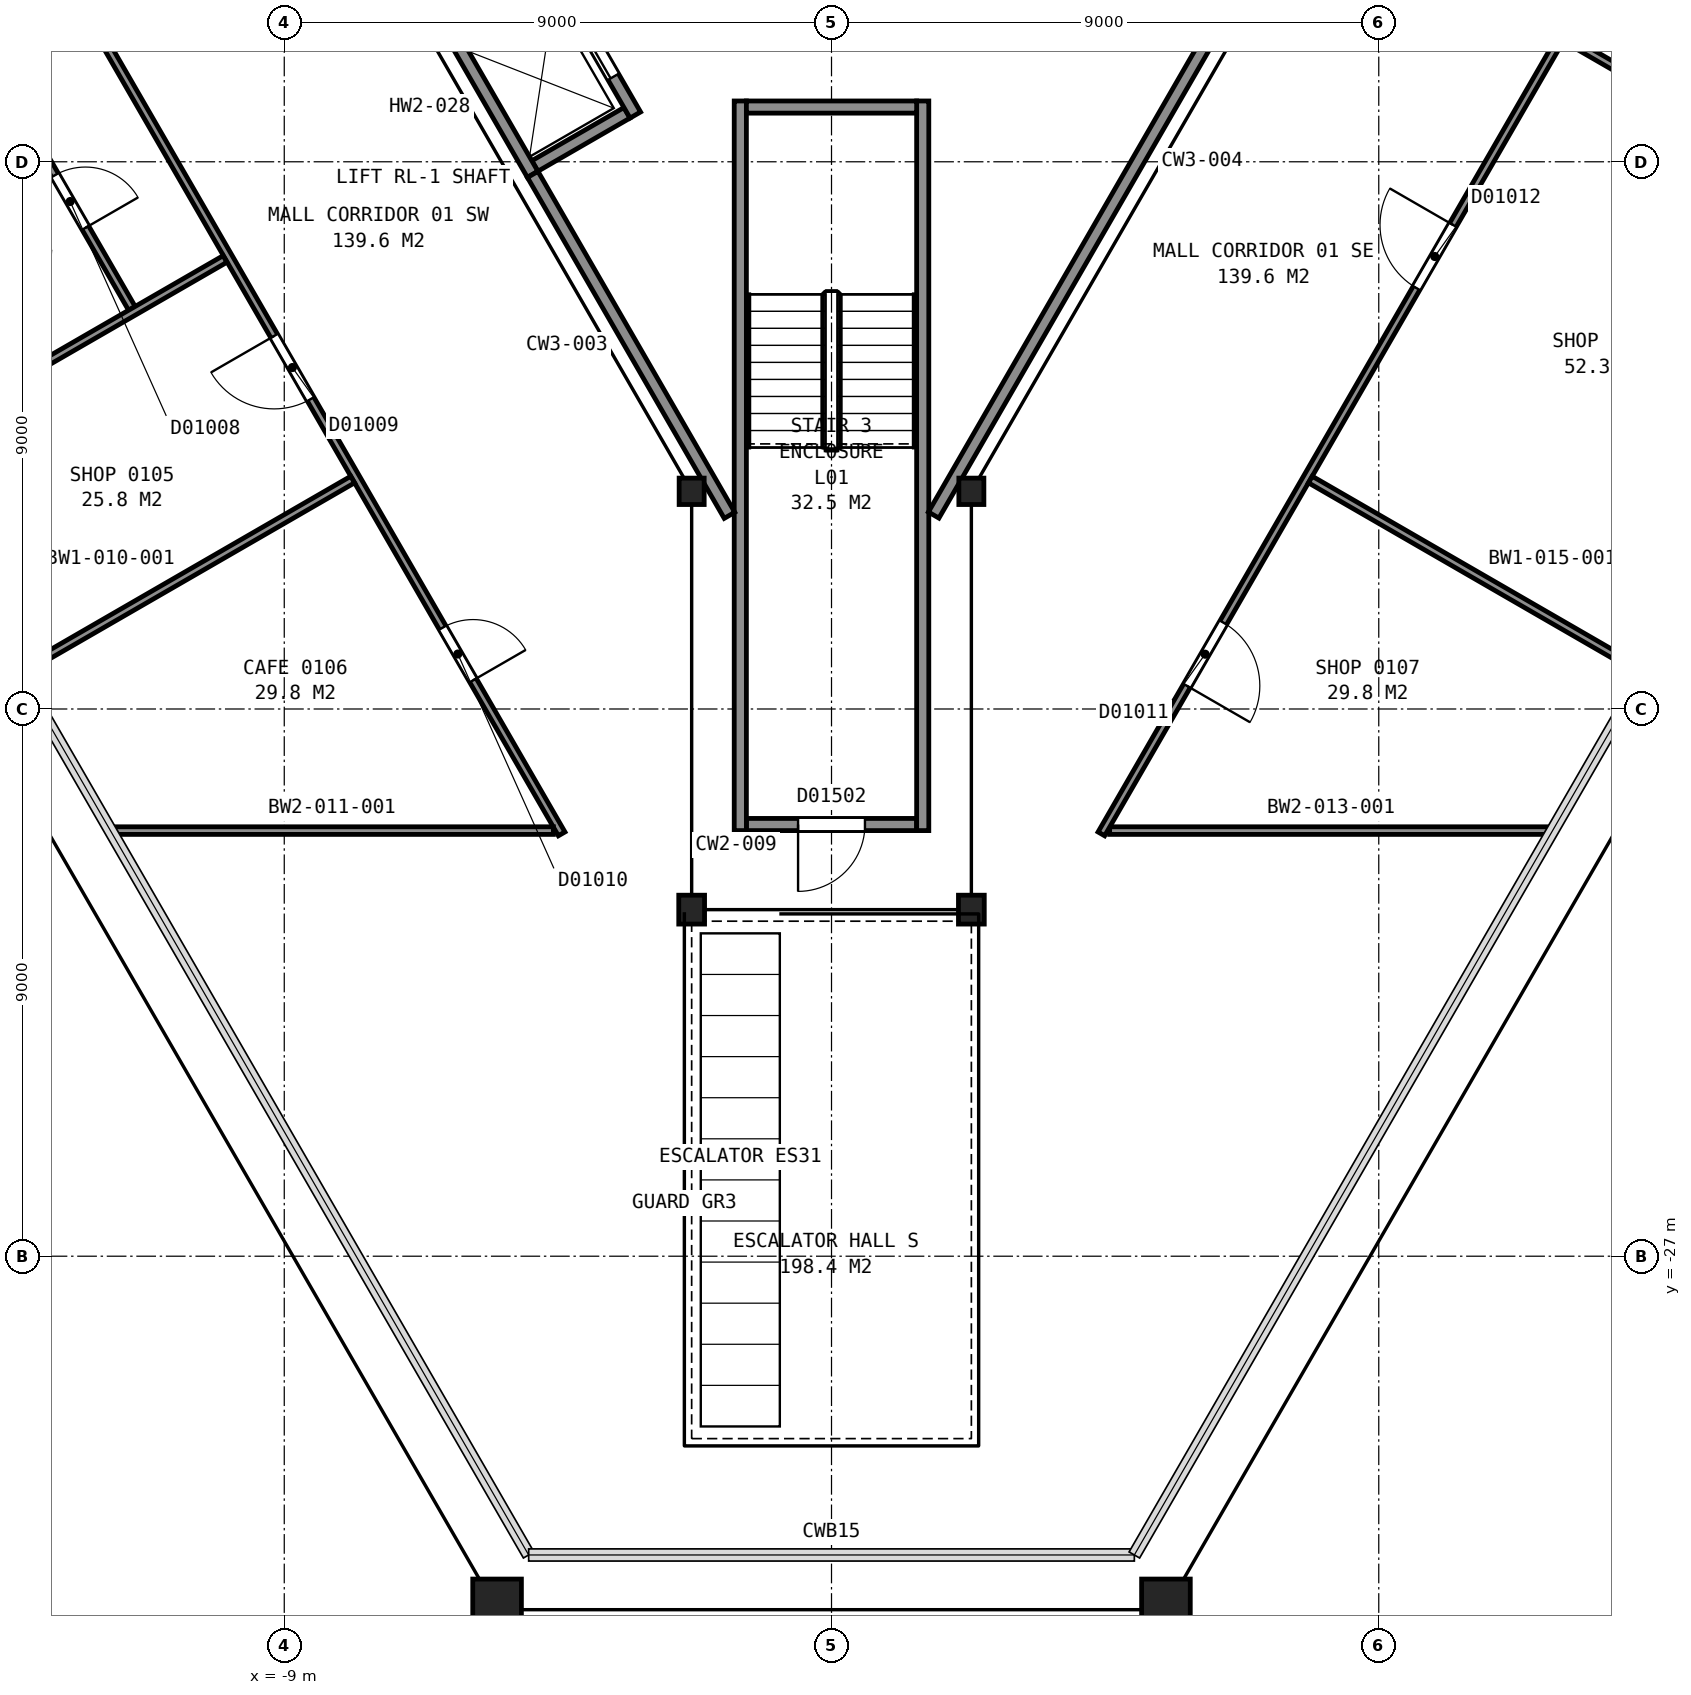
"""IFC4 building model, lengths in metres.
Left out: names, types, materials, properties, quantities, classifications, styles, units other than length and angle.
Written with IfcOpenShell. Run it as: python <this file> out.ifc"""

import sys

from ifc_helpers import new_model, si_unit, direction, frame, frame_2d, origin, origin_2d, place, context, subcontext, project, spatial, rectangle, hollow_rectangle, i_section, extrude, element, fill, save


model = new_model("IFC4")
c1 = context("Model", 3, precision=1e-05, world=origin(), true_north=direction((0.0, 1.0)))
c2 = subcontext(c1, "Body", "Model", "MODEL_VIEW")
j1 = project(units=[si_unit("LENGTHUNIT", "METRE"), si_unit("PLANEANGLEUNIT", "RADIAN")], contexts=[c1])
p1 = place(None, origin())
s1 = spatial("IfcSite", under=j1, at=p1, CompositionType="ELEMENT")
p2 = place(p1, origin())
s2 = spatial("IfcBuilding", under=s1, at=p2, CompositionType="ELEMENT")
p3 = place(p2, frame((0.0, 0.0, 12.0)))
s3 = spatial("IfcBuildingStorey", under=s2, at=p3, CompositionType="ELEMENT", Elevation=12.0)
for number, where, z_axis, x_axis in (
    (1, (-5.5, -32.81, 0.0), (0.0, 0.0, 1.0), (-1.0, 0.0, 0.0)),
    (2, (5.5, -32.81, 0.0), (0.0, 0.0, 1.0), (-1.0, 0.0, 0.0)),
):
    element("IfcColumn", number, at=place(p3, frame(where, z_axis=z_axis, x_axis=x_axis)), inside=s3, PredefinedType="COLUMN", context=c2, shape_type="SweptSolid", body=[
        extrude(hollow_rectangle(XDim=0.8, YDim=1.0, WallThickness=0.075, at=origin_2d()), origin(), (0.0, 0.0, 1.0), 5.4),
    ])
p4 = place(p3, frame((-2.3, -14.42, 0.0), z_axis=(0.0, 0.0, 1.0), x_axis=(1.0, 0.0, 0.0)))
e3 = element("IfcColumn", 3, at=p4, inside=s3, PredefinedType="COLUMN", context=c2, shape_type="SweptSolid", body=[
    extrude(i_section(OverallWidth=0.411, OverallDepth=0.434, WebThickness=0.036, FlangeThickness=0.057, FilletRadius=0.015, at=origin_2d()), origin(), (0.0, 0.0, 1.0), 5.4),
])
for number, where, z_axis, x_axis in (
    (4, (-2.3, -21.3, 0.0), (0.0, 0.0, 1.0), (-1.0, 0.0, 0.0)),
    (5, (2.3, -21.3, 0.0), (0.0, 0.0, 1.0), (-1.0, 0.0, 0.0)),
):
    element("IfcColumn", number, at=place(p3, frame(where, z_axis=z_axis, x_axis=x_axis)), inside=s3, PredefinedType="COLUMN", context=c2, shape_type="SweptSolid", body=[
        extrude(i_section(OverallWidth=0.424, OverallDepth=0.475, WebThickness=0.048, FlangeThickness=0.077, FilletRadius=0.015, at=origin_2d()), origin(), (0.0, 0.0, 1.0), 5.4),
    ])
p5 = place(p3, frame((2.3, -14.42, 0.0), z_axis=(0.0, 0.0, 1.0), x_axis=(1.0, 0.0, 0.0)))
e6 = element("IfcColumn", 6, at=p5, inside=s3, PredefinedType="COLUMN", context=c2, shape_type="SweptSolid", body=[
    extrude(i_section(OverallWidth=0.411, OverallDepth=0.434, WebThickness=0.036, FlangeThickness=0.057, FilletRadius=0.015, at=origin_2d()), origin(), (0.0, 0.0, 1.0), 5.4),
])
p6 = place(p3, frame((-1.4, -19.9, 0.0), z_axis=(0.0, 0.0, 1.0), x_axis=(1.0, 0.0, 0.0)))
e7 = element("IfcWall", 7, at=p6, inside=s3, PredefinedType="PARTITIONING", context=c2, shape_type="SweptSolid", body=[
    extrude(rectangle(XDim=2.8, YDim=0.2, at=frame_2d((1.4, 0.0))), origin(), (0.0, 0.0, 1.0), 5.15),
])
p7 = place(p6, frame((0.85, 0.0, 0.0)))
e8 = element("IfcOpeningElement", 8, at=p7, cuts=e7, PredefinedType="OPENING", context=c2, shape_type="SweptSolid", body=[
    extrude(rectangle(XDim=1.1, YDim=2.1, at=frame_2d((0.55, 1.05))), frame((0.0, 0.11, 0.0), z_axis=(0.0, -1.0, 0.0), x_axis=(1.0, 0.0, 0.0)), (0.0, 0.0, 1.0), 0.22),
])
for number, where, z_axis, x_axis in (
    (9, (1.5, -8.0, 0.0), (0.0, 0.0, 1.0), (0.0, -1.0, 0.0)),
    (10, (-1.5, -8.0, 0.0), (0.0, 0.0, 1.0), (0.0, -1.0, 0.0)),
):
    element("IfcWall", number, at=place(p3, frame(where, z_axis=z_axis, x_axis=x_axis)), inside=s3, PredefinedType="PARTITIONING", context=c2, shape_type="SweptSolid", body=[
        extrude(rectangle(XDim=12.0, YDim=0.2, at=frame_2d((6.0, 0.0))), origin(), (0.0, 0.0, 1.0), 5.15),
    ])
p8 = place(p3, frame((-1.4, -8.1, 0.0), z_axis=(0.0, 0.0, 1.0), x_axis=(1.0, 0.0, 0.0)))
e11 = element("IfcWall", 11, at=p8, inside=s3, PredefinedType="PARTITIONING", context=c2, shape_type="SweptSolid", body=[
    extrude(rectangle(XDim=2.8, YDim=0.2, at=frame_2d((1.4, 0.0))), origin(), (0.0, 0.0, 1.0), 5.15),
])
p9 = place(p3, frame((-4.879, -9.07, 0.0), z_axis=(0.0, 0.0, 1.0), x_axis=(0.866036909293, 0.499980071345, 0.0)))
e12 = element("IfcWall", 12, at=p9, inside=s3, PredefinedType="PARTITIONING", context=c2, shape_type="SweptSolid", body=[
    extrude(rectangle(XDim=1.75, YDim=0.2, at=frame_2d((0.875, 0.0))), origin(), (0.0, 0.0, 1.0), 5.4),
])
p10 = place(p3, frame((-3.227, -8.231, 0.0), z_axis=(0.0, 0.0, 1.0), x_axis=(-0.499948979701, 0.866054858364, 0.0)))
e13 = element("IfcWall", 13, at=p10, inside=s3, PredefinedType="PARTITIONING", context=c2, shape_type="SweptSolid", body=[
    extrude(rectangle(XDim=2.55, YDim=0.2, at=frame_2d((1.275, 0.0))), origin(), (0.0, 0.0, 1.0), 5.4),
])
p11 = place(p10, frame((0.725, 0.0, 0.0)))
e14 = element("IfcOpeningElement", 14, at=p11, cuts=e13, PredefinedType="OPENING", context=c2, shape_type="SweptSolid", body=[
    extrude(rectangle(XDim=1.1, YDim=2.1, at=frame_2d((0.55, 1.05))), frame((0.0, 0.11, 0.0), z_axis=(0.0, -1.0, 0.0), x_axis=(1.0, 0.0, 0.0)), (0.0, 0.0, 1.0), 0.22),
])
p12 = place(p3, frame((-4.916, -9.206, 0.0), z_axis=(0.0, 0.0, 1.0), x_axis=(-0.499990435942, 0.866030925526, 0.0)))
e15 = element("IfcWall", 15, at=p12, inside=s3, PredefinedType="PARTITIONING", context=c2, shape_type="SweptSolid", body=[
    extrude(rectangle(XDim=2.55, YDim=0.2, at=frame_2d((1.275, 0.0))), origin(), (0.0, 0.0, 1.0), 5.4),
])
p13 = place(p3, frame((-4.914, -9.208, 0.0), z_axis=(0.0, 0.0, 1.0), x_axis=(0.499947703927, -0.866055594831, 0.0)))
e16 = element("IfcWall", 16, at=p13, inside=s3, PredefinedType="PARTITIONING", context=c2, shape_type="SweptSolid", body=[
    extrude(rectangle(XDim=6.474, YDim=0.2, at=frame_2d((3.237, 0.0))), origin(), (0.0, 0.0, 1.0), 5.15),
])
p14 = place(p3, frame((1.68, -14.811, 0.0), z_axis=(0.0, 0.0, 1.0), x_axis=(0.499994327219, 0.866028678941, 0.0)))
e17 = element("IfcWall", 17, at=p14, inside=s3, PredefinedType="PARTITIONING", context=c2, shape_type="SweptSolid", body=[
    extrude(rectangle(XDim=23.968, YDim=0.2, at=frame_2d((11.984, 0.0))), origin(), (0.0, 0.0, 1.0), 5.15),
])
p15 = place(p14, frame((13.44, 0.0, 0.0)))
e18 = element("IfcOpeningElement", 18, at=p15, cuts=e17, PredefinedType="OPENING", context=c2, shape_type="SweptSolid", body=[
    extrude(rectangle(XDim=1.8, YDim=2.1, at=frame_2d((0.9, 1.05))), frame((0.0, 0.11, 0.0), z_axis=(0.0, -1.0, 0.0), x_axis=(1.0, 0.0, 0.0)), (0.0, 0.0, 1.0), 0.22),
])
p16 = place(p3, frame((-4.438, -20.054, 0.0), z_axis=(0.0, 0.0, 1.0), x_axis=(-0.499994028088, 0.866028851642, 0.0)))
e19 = element("IfcWall", 19, at=p16, inside=s3, PredefinedType="PARTITIONING", context=c2, shape_type="SweptSolid", body=[
    extrude(rectangle(XDim=30.297, YDim=0.125, at=frame_2d((15.148, 0.0))), origin(), (0.0, 0.0, 1.0), 4.253),
])
p17 = place(p16, frame((26.285, 0.0, 0.0)))
e20 = element("IfcOpeningElement", 20, at=p17, cuts=e19, PredefinedType="OPENING", context=c2, shape_type="SweptSolid", body=[
    extrude(rectangle(XDim=1.2, YDim=2.1, at=frame_2d((0.6, 1.05))), frame((0.0, 0.073, 0.0), z_axis=(0.0, -1.0, 0.0), x_axis=(1.0, 0.0, 0.0)), (0.0, 0.0, 1.0), 0.145),
])
p18 = place(p16, frame((16.731, 0.0, 0.0)))
e21 = element("IfcOpeningElement", 21, at=p18, cuts=e19, PredefinedType="OPENING", context=c2, shape_type="SweptSolid", body=[
    extrude(rectangle(XDim=1.0, YDim=2.1, at=frame_2d((0.5, 1.05))), frame((0.0, 0.073, 0.0), z_axis=(0.0, -1.0, 0.0), x_axis=(1.0, 0.0, 0.0)), (0.0, 0.0, 1.0), 0.145),
])
p19 = place(p16, frame((8.257, 0.0, 0.0)))
e22 = element("IfcOpeningElement", 22, at=p19, cuts=e19, PredefinedType="OPENING", context=c2, shape_type="SweptSolid", body=[
    extrude(rectangle(XDim=1.2, YDim=2.1, at=frame_2d((0.6, 1.05))), frame((0.0, 0.073, 0.0), z_axis=(0.0, -1.0, 0.0), x_axis=(1.0, 0.0, 0.0)), (0.0, 0.0, 1.0), 0.145),
])
p20 = place(p16, frame((2.916, 0.0, 0.0)))
e23 = element("IfcOpeningElement", 23, at=p20, cuts=e19, PredefinedType="OPENING", context=c2, shape_type="SweptSolid", body=[
    extrude(rectangle(XDim=1.0, YDim=2.1, at=frame_2d((0.5, 1.05))), frame((0.0, 0.073, 0.0), z_axis=(0.0, -1.0, 0.0), x_axis=(1.0, 0.0, 0.0)), (0.0, 0.0, 1.0), 0.145),
])
p21 = place(p3, frame((-11.506, -11.411, 0.0), z_axis=(0.0, 0.0, 1.0), x_axis=(-0.499977189168, 0.866038573224, 0.0)))
e24 = element("IfcWall", 24, at=p21, inside=s3, PredefinedType="PARTITIONING", context=c2, shape_type="SweptSolid", body=[
    extrude(rectangle(XDim=12.444, YDim=0.125, at=frame_2d((6.222, 0.0))), origin(), (0.0, 0.0, 1.0), 5.24),
])
p22 = place(p21, frame((9.912, 0.0, 0.0)))
e25 = element("IfcOpeningElement", 25, at=p22, cuts=e24, PredefinedType="OPENING", context=c2, shape_type="SweptSolid", body=[
    extrude(rectangle(XDim=1.0, YDim=2.1, at=frame_2d((0.5, 1.05))), frame((0.0, 0.073, 0.0), z_axis=(0.0, -1.0, 0.0), x_axis=(1.0, 0.0, 0.0)), (0.0, 0.0, 1.0), 0.145),
])
p23 = place(p21, frame((5.72, 0.0, 0.0)))
e26 = element("IfcOpeningElement", 26, at=p23, cuts=e24, PredefinedType="OPENING", context=c2, shape_type="SweptSolid", body=[
    extrude(rectangle(XDim=1.0, YDim=2.1, at=frame_2d((0.5, 1.05))), frame((0.0, 0.073, 0.0), z_axis=(0.0, -1.0, 0.0), x_axis=(1.0, 0.0, 0.0)), (0.0, 0.0, 1.0), 0.145),
])
p24 = place(p21, frame((1.529, 0.0, 0.0)))
e27 = element("IfcOpeningElement", 27, at=p24, cuts=e24, PredefinedType="OPENING", context=c2, shape_type="SweptSolid", body=[
    extrude(rectangle(XDim=1.0, YDim=2.1, at=frame_2d((0.5, 1.05))), frame((0.0, 0.073, 0.0), z_axis=(0.0, -1.0, 0.0), x_axis=(1.0, 0.0, 0.0)), (0.0, 0.0, 1.0), 0.145),
])
p25 = place(p3, frame((-15.459, -13.765, 0.0), z_axis=(0.0, 0.0, 1.0), x_axis=(0.866044997331, 0.499966061446, 0.0)))
e28 = element("IfcWall", 28, at=p25, inside=s3, PredefinedType="PARTITIONING", context=c2, shape_type="SweptSolid", body=[
    extrude(rectangle(XDim=6.333, YDim=0.125, at=frame_2d((3.167, 0.0))), origin(), (0.0, 0.0, 1.0), 5.24),
])
p26 = place(p3, frame((-13.363, -17.395, 0.0), z_axis=(0.0, 0.0, 1.0), x_axis=(0.866003371142, 0.500038159714, 0.0)))
e29 = element("IfcWall", 29, at=p26, inside=s3, PredefinedType="PARTITIONING", context=c2, shape_type="SweptSolid", body=[
    extrude(rectangle(XDim=6.337, YDim=0.125, at=frame_2d((3.168, 0.0))), origin(), (0.0, 0.0, 1.0), 4.253),
])
for number, where, z_axis, x_axis in (
    (30, (-11.859, -20.0, 0.0), (0.0, 0.0, 1.0), (1.0, 0.0, 0.0)),
    (31, (4.574, -20.0, 0.0), (0.0, 0.0, 1.0), (1.0, 0.0, 0.0)),
):
    element("IfcWall", number, at=place(p3, frame(where, z_axis=z_axis, x_axis=x_axis)), inside=s3, PredefinedType="PARTITIONING", context=c2, shape_type="SweptSolid", body=[
        extrude(rectangle(XDim=7.285, YDim=0.125, at=frame_2d((3.643, 0.0))), origin(), (0.0, 0.0, 1.0), 5.24),
    ])
p27 = place(p3, frame((19.586, 6.184, 0.0), z_axis=(0.0, 0.0, 1.0), x_axis=(-0.499994028088, -0.866028851642, 0.0)))
e32 = element("IfcWall", 32, at=p27, inside=s3, PredefinedType="PARTITIONING", context=c2, shape_type="SweptSolid", body=[
    extrude(rectangle(XDim=30.297, YDim=0.125, at=frame_2d((15.148, 0.0))), origin(), (0.0, 0.0, 1.0), 4.253),
])
p28 = place(p27, frame((26.285, 0.0, 0.0)))
e33 = element("IfcOpeningElement", 33, at=p28, cuts=e32, PredefinedType="OPENING", context=c2, shape_type="SweptSolid", body=[
    extrude(rectangle(XDim=1.2, YDim=2.1, at=frame_2d((0.6, 1.05))), frame((0.0, 0.073, 0.0), z_axis=(0.0, -1.0, 0.0), x_axis=(1.0, 0.0, 0.0)), (0.0, 0.0, 1.0), 0.145),
])
p29 = place(p27, frame((18.732, 0.0, 0.0)))
e34 = element("IfcOpeningElement", 34, at=p29, cuts=e32, PredefinedType="OPENING", context=c2, shape_type="SweptSolid", body=[
    extrude(rectangle(XDim=1.2, YDim=2.1, at=frame_2d((0.6, 1.05))), frame((0.0, 0.073, 0.0), z_axis=(0.0, -1.0, 0.0), x_axis=(1.0, 0.0, 0.0)), (0.0, 0.0, 1.0), 0.145),
])
for number, where, z_axis, x_axis in (
    (35, (7.875, -14.226, 0.0), (0.0, 0.0, 1.0), (0.866, -0.5, 0.0)),
    (36, (12.066, -6.966, 0.0), (0.0, 0.0, 1.0), (0.866, -0.5, 0.0)),
):
    element("IfcWall", number, at=place(p3, frame(where, z_axis=z_axis, x_axis=x_axis)), inside=s3, PredefinedType="PARTITIONING", context=c2, shape_type="SweptSolid", body=[
        extrude(rectangle(XDim=6.337, YDim=0.125, at=frame_2d((3.168, 0.0))), origin(), (0.0, 0.0, 1.0), 4.253),
    ])
p30 = place(p7, origin())
e37 = element("IfcDoor", 37, at=p30, inside=s3, OperationType="SINGLE_SWING_LEFT", PredefinedType="DOOR", context=c2, shape_type="SweptSolid", body=[
    extrude(rectangle(XDim=1.1, YDim=2.1, at=frame_2d((0.55, 1.05))), frame((0.0, 0.025, 0.0), z_axis=(0.0, -1.0, 0.0), x_axis=(1.0, 0.0, 0.0)), (0.0, 0.0, 1.0), 0.05),
])
fill(e8, e37)
p31 = place(p11, origin())
e38 = element("IfcDoor", 38, at=p31, inside=s3, OperationType="SLIDING_TO_LEFT", PredefinedType="DOOR", context=c2, shape_type="SweptSolid", body=[
    extrude(rectangle(XDim=1.1, YDim=2.1, at=frame_2d((0.55, 1.05))), frame((0.0, 0.025, 0.0), z_axis=(0.0, -1.0, 0.0), x_axis=(1.0, 0.0, 0.0)), (0.0, 0.0, 1.0), 0.05),
])
fill(e14, e38)
p32 = place(p19, origin())
e39 = element("IfcDoor", 39, at=p32, inside=s3, OperationType="SINGLE_SWING_RIGHT", PredefinedType="DOOR", context=c2, shape_type="SweptSolid", body=[
    extrude(rectangle(XDim=1.2, YDim=2.1, at=frame_2d((0.6, 1.05))), frame((0.0, 0.025, 0.0), z_axis=(0.0, -1.0, 0.0), x_axis=(1.0, 0.0, 0.0)), (0.0, 0.0, 1.0), 0.05),
])
fill(e22, e39)
p33 = place(p20, origin())
e40 = element("IfcDoor", 40, at=p33, inside=s3, OperationType="SINGLE_SWING_LEFT", PredefinedType="DOOR", context=c2, shape_type="SweptSolid", body=[
    extrude(rectangle(XDim=1.0, YDim=2.1, at=frame_2d((0.5, 1.05))), frame((0.0, 0.025, 0.0), z_axis=(0.0, -1.0, 0.0), x_axis=(1.0, 0.0, 0.0)), (0.0, 0.0, 1.0), 0.05),
])
fill(e23, e40)
p34 = place(p24, origin())
e41 = element("IfcDoor", 41, at=p34, inside=s3, OperationType="SINGLE_SWING_LEFT", PredefinedType="DOOR", context=c2, shape_type="SweptSolid", body=[
    extrude(rectangle(XDim=1.0, YDim=2.1, at=frame_2d((0.5, 1.05))), frame((0.0, 0.025, 0.0), z_axis=(0.0, -1.0, 0.0), x_axis=(1.0, 0.0, 0.0)), (0.0, 0.0, 1.0), 0.05),
])
fill(e27, e41)
p35 = place(p28, origin())
e42 = element("IfcDoor", 42, at=p35, inside=s3, OperationType="SINGLE_SWING_RIGHT", PredefinedType="DOOR", context=c2, shape_type="SweptSolid", body=[
    extrude(rectangle(XDim=1.2, YDim=2.1, at=frame_2d((0.6, 1.05))), frame((0.0, 0.025, 0.0), z_axis=(0.0, -1.0, 0.0), x_axis=(1.0, 0.0, 0.0)), (0.0, 0.0, 1.0), 0.05),
])
fill(e33, e42)
p36 = place(p29, origin())
e43 = element("IfcDoor", 43, at=p36, inside=s3, OperationType="SINGLE_SWING_LEFT", PredefinedType="DOOR", context=c2, shape_type="SweptSolid", body=[
    extrude(rectangle(XDim=1.2, YDim=2.1, at=frame_2d((0.6, 1.05))), frame((0.0, 0.025, 0.0), z_axis=(0.0, -1.0, 0.0), x_axis=(1.0, 0.0, 0.0)), (0.0, 0.0, 1.0), 0.05),
])
fill(e34, e43)
save(model, sys.argv[1])
